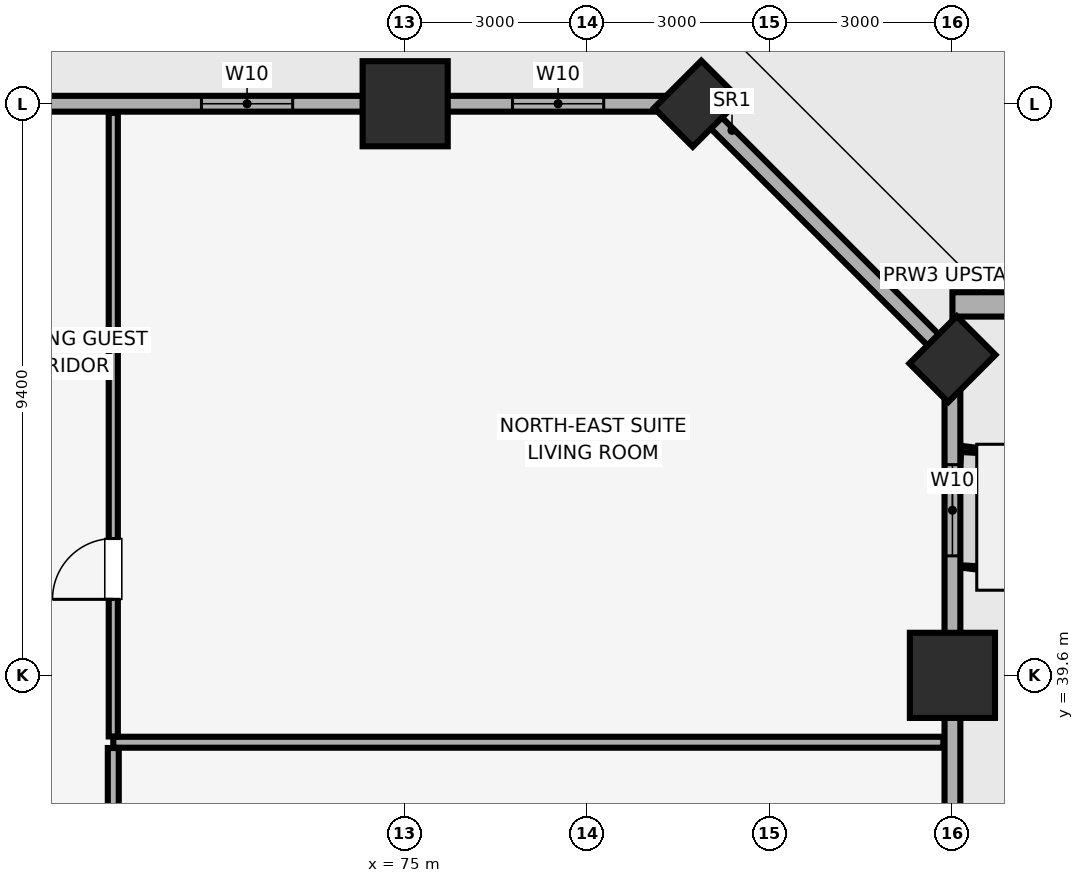
"""IFC4 building model, lengths in metres.
Left out: names, types, materials, properties, quantities, classifications, styles, units other than length and angle.
Written with IfcOpenShell. Run it as: python <this file> out.ifc"""

import sys

from ifc_helpers import new_model, si_unit, direction, frame, frame_2d, origin, origin_2d, place, context, subcontext, project, spatial, rectangle, extrude, element, fill, save


model = new_model("IFC4")
c1 = context("Model", 3, precision=1e-05, world=origin(), true_north=direction((0.0, 1.0)))
c2 = subcontext(c1, "Body", "Model", "MODEL_VIEW")
j1 = project(units=[si_unit("LENGTHUNIT", "METRE"), si_unit("PLANEANGLEUNIT", "RADIAN")], contexts=[c1])
p1 = place(None, origin())
s1 = spatial("IfcSite", under=j1, at=p1, CompositionType="ELEMENT")
p2 = place(p1, origin())
s2 = spatial("IfcBuilding", under=s1, at=p2, CompositionType="ELEMENT")
p3 = place(p2, frame((0.0, 0.0, 31.4)))
s3 = spatial("IfcBuildingStorey", under=s2, at=p3, CompositionType="ELEMENT", Elevation=31.4)
p4 = place(p3, frame((84.0, 39.6, 0.0), z_axis=(0.0, 0.0, 1.0), x_axis=(1.0, 0.0, 0.0)))
e1 = element("IfcColumn", 1, at=p4, inside=s3, PredefinedType="COLUMN", context=c2, shape_type="SweptSolid", body=[
    extrude(rectangle(XDim=1.4, YDim=1.4, at=origin_2d()), origin(), (0.0, 0.0, 1.0), 3.51),
])
for number, where, z_axis, x_axis in (
    (2, (84.0, 44.8, 0.0), (0.0, 0.0, 1.0), (0.707, 0.707, 0.0)),
    (3, (79.8, 49.0, 0.0), (0.0, 0.0, 1.0), (0.707, 0.707, 0.0)),
):
    element("IfcColumn", number, at=place(p3, frame(where, z_axis=z_axis, x_axis=x_axis)), inside=s3, PredefinedType="PILASTER", context=c2, shape_type="SweptSolid", body=[
        extrude(rectangle(XDim=1.1, YDim=0.9, at=origin_2d()), origin(), (0.0, 0.0, 1.0), 3.51),
    ])
p5 = place(p3, frame((75.0, 49.0, 0.0), z_axis=(0.0, 0.0, 1.0), x_axis=(1.0, 0.0, 0.0)))
e4 = element("IfcColumn", 4, at=p5, inside=s3, PredefinedType="COLUMN", context=c2, shape_type="SweptSolid", body=[
    extrude(rectangle(XDim=1.4, YDim=1.4, at=origin_2d()), origin(), (0.0, 0.0, 1.0), 3.51),
])
p6 = place(p3, frame((84.0, 4.2, 0.0), z_axis=(0.0, 0.0, 1.0), x_axis=(0.0, 1.0, 0.0)))
e5 = element("IfcWall", 5, at=p6, inside=s3, PredefinedType="SOLIDWALL", context=c2, shape_type="SweptSolid", body=[
    extrude(rectangle(XDim=40.6, YDim=0.26, at=frame_2d((20.3, 0.0))), origin(), (0.0, 0.0, 1.0), 2.56),
])
p7 = place(p6, frame((17.3, 0.0, 0.0)))
e6 = element("IfcOpeningElement", 6, at=p7, cuts=e5, PredefinedType="OPENING", context=c2, shape_type="SweptSolid", body=[
    extrude(rectangle(XDim=1.4, YDim=2.2, at=frame_2d((0.7, 1.1))), frame((0.0, 0.14, 0.0), z_axis=(0.0, -1.0, 0.0), x_axis=(1.0, 0.0, 0.0)), (0.0, 0.0, 1.0), 0.28),
])
p8 = place(p6, frame((7.675, 0.0, 0.85)))
e7 = element("IfcOpeningElement", 7, at=p8, cuts=e5, PredefinedType="OPENING", context=c2, shape_type="SweptSolid", body=[
    extrude(rectangle(XDim=1.5, YDim=1.4, at=frame_2d((0.75, 0.7))), frame((0.0, 0.14, 0.0), z_axis=(0.0, -1.0, 0.0), x_axis=(1.0, 0.0, 0.0)), (0.0, 0.0, 1.0), 0.28),
])
p9 = place(p6, frame((12.76, 0.0, 0.85)))
e8 = element("IfcOpeningElement", 8, at=p9, cuts=e5, PredefinedType="OPENING", context=c2, shape_type="SweptSolid", body=[
    extrude(rectangle(XDim=1.5, YDim=1.4, at=frame_2d((0.75, 0.7))), frame((0.0, 0.14, 0.0), z_axis=(0.0, -1.0, 0.0), x_axis=(1.0, 0.0, 0.0)), (0.0, 0.0, 1.0), 0.28),
])
p10 = place(p6, frame((21.11, 0.0, 0.85)))
e9 = element("IfcOpeningElement", 9, at=p10, cuts=e5, PredefinedType="OPENING", context=c2, shape_type="SweptSolid", body=[
    extrude(rectangle(XDim=1.5, YDim=1.4, at=frame_2d((0.75, 0.7))), frame((0.0, 0.14, 0.0), z_axis=(0.0, -1.0, 0.0), x_axis=(1.0, 0.0, 0.0)), (0.0, 0.0, 1.0), 0.28),
])
p11 = place(p6, frame((29.2, 0.0, 0.85)))
e10 = element("IfcOpeningElement", 10, at=p11, cuts=e5, PredefinedType="OPENING", context=c2, shape_type="SweptSolid", body=[
    extrude(rectangle(XDim=1.5, YDim=1.4, at=frame_2d((0.75, 0.7))), frame((0.0, 0.14, 0.0), z_axis=(0.0, -1.0, 0.0), x_axis=(1.0, 0.0, 0.0)), (0.0, 0.0, 1.0), 0.28),
])
p12 = place(p6, frame((37.365, 0.0, 0.85)))
e11 = element("IfcOpeningElement", 11, at=p12, cuts=e5, PredefinedType="OPENING", context=c2, shape_type="SweptSolid", body=[
    extrude(rectangle(XDim=1.5, YDim=1.4, at=frame_2d((0.75, 0.7))), frame((0.0, 0.14, 0.0), z_axis=(0.0, -1.0, 0.0), x_axis=(1.0, 0.0, 0.0)), (0.0, 0.0, 1.0), 0.28),
])
p13 = place(p3, frame((84.0, 44.8, 0.0), z_axis=(0.0, 0.0, 1.0), x_axis=(-0.707106781187, 0.707106781187, 0.0)))
e12 = element("IfcWall", 12, at=p13, inside=s3, PredefinedType="SOLIDWALL", context=c2, shape_type="SweptSolid", body=[
    extrude(rectangle(XDim=5.94, YDim=0.26, at=frame_2d((2.97, 0.0))), origin(), (0.0, 0.0, 1.0), 2.56),
])
p14 = place(p3, frame((79.8, 49.0, 0.0), z_axis=(0.0, 0.0, 1.0), x_axis=(-1.0, 0.0, 0.0)))
e13 = element("IfcWall", 13, at=p14, inside=s3, PredefinedType="SOLIDWALL", context=c2, shape_type="SweptSolid", body=[
    extrude(rectangle(XDim=75.6, YDim=0.26, at=frame_2d((37.8, 0.0))), origin(), (0.0, 0.0, 1.0), 2.56),
])
p15 = place(p14, frame((72.565, 0.0, 0.85)))
e14 = element("IfcOpeningElement", 14, at=p15, cuts=e13, PredefinedType="OPENING", context=c2, shape_type="SweptSolid", body=[
    extrude(rectangle(XDim=1.5, YDim=1.4, at=frame_2d((0.75, 0.7))), frame((0.0, 0.14, 0.0), z_axis=(0.0, -1.0, 0.0), x_axis=(1.0, 0.0, 0.0)), (0.0, 0.0, 1.0), 0.28),
])
p16 = place(p14, frame((67.45, 0.0, 0.85)))
e15 = element("IfcOpeningElement", 15, at=p16, cuts=e13, PredefinedType="OPENING", context=c2, shape_type="SweptSolid", body=[
    extrude(rectangle(XDim=1.5, YDim=1.4, at=frame_2d((0.75, 0.7))), frame((0.0, 0.14, 0.0), z_axis=(0.0, -1.0, 0.0), x_axis=(1.0, 0.0, 0.0)), (0.0, 0.0, 1.0), 0.28),
])
p17 = place(p14, frame((6.65, 0.0, 0.85)))
e16 = element("IfcOpeningElement", 16, at=p17, cuts=e13, PredefinedType="OPENING", context=c2, shape_type="SweptSolid", body=[
    extrude(rectangle(XDim=1.5, YDim=1.4, at=frame_2d((0.75, 0.7))), frame((0.0, 0.14, 0.0), z_axis=(0.0, -1.0, 0.0), x_axis=(1.0, 0.0, 0.0)), (0.0, 0.0, 1.0), 0.28),
])
p18 = place(p14, frame((1.535, 0.0, 0.85)))
e17 = element("IfcOpeningElement", 17, at=p18, cuts=e13, PredefinedType="OPENING", context=c2, shape_type="SweptSolid", body=[
    extrude(rectangle(XDim=1.5, YDim=1.4, at=frame_2d((0.75, 0.7))), frame((0.0, 0.14, 0.0), z_axis=(0.0, -1.0, 0.0), x_axis=(1.0, 0.0, 0.0)), (0.0, 0.0, 1.0), 0.28),
])
p19 = place(p14, frame((51.365, 0.0, 0.9)))
e18 = element("IfcOpeningElement", 18, at=p19, cuts=e13, PredefinedType="OPENING", context=c2, shape_type="SweptSolid", body=[
    extrude(rectangle(XDim=1.5, YDim=1.4, at=frame_2d((0.75, 0.7))), frame((0.0, 0.14, 0.0), z_axis=(0.0, -1.0, 0.0), x_axis=(1.0, 0.0, 0.0)), (0.0, 0.0, 1.0), 0.28),
])
p20 = place(p14, frame((46.0, 0.0, 0.9)))
e19 = element("IfcOpeningElement", 19, at=p20, cuts=e13, PredefinedType="OPENING", context=c2, shape_type="SweptSolid", body=[
    extrude(rectangle(XDim=1.5, YDim=1.4, at=frame_2d((0.75, 0.7))), frame((0.0, 0.14, 0.0), z_axis=(0.0, -1.0, 0.0), x_axis=(1.0, 0.0, 0.0)), (0.0, 0.0, 1.0), 0.28),
])
p21 = place(p14, frame((29.15, 0.0, 0.9)))
e20 = element("IfcOpeningElement", 20, at=p21, cuts=e13, PredefinedType="OPENING", context=c2, shape_type="SweptSolid", body=[
    extrude(rectangle(XDim=1.5, YDim=1.4, at=frame_2d((0.75, 0.7))), frame((0.0, 0.14, 0.0), z_axis=(0.0, -1.0, 0.0), x_axis=(1.0, 0.0, 0.0)), (0.0, 0.0, 1.0), 0.28),
])
p22 = place(p14, frame((23.485, 0.0, 0.9)))
e21 = element("IfcOpeningElement", 21, at=p22, cuts=e13, PredefinedType="OPENING", context=c2, shape_type="SweptSolid", body=[
    extrude(rectangle(XDim=1.5, YDim=1.4, at=frame_2d((0.75, 0.7))), frame((0.0, 0.14, 0.0), z_axis=(0.0, -1.0, 0.0), x_axis=(1.0, 0.0, 0.0)), (0.0, 0.0, 1.0), 0.28),
])
p23 = place(p3, frame((84.0, 45.7, -0.24), z_axis=(0.0, 0.0, 1.0), x_axis=(1.0, 0.0, 0.0)))
e22 = element("IfcWall", 22, at=p23, inside=s3, PredefinedType="PARAPET", context=c2, shape_type="SweptSolid", body=[
    extrude(rectangle(XDim=3.2, YDim=0.4, at=frame_2d((1.6, 0.0))), origin(), (0.0, 0.0, 1.0), 1.44),
])
p24 = place(p3, frame((70.2, 38.5, 0.0), z_axis=(0.0, 0.0, 1.0), x_axis=(1.0, 0.0, 0.0)))
e23 = element("IfcWall", 23, at=p24, inside=s3, PredefinedType="PARTITIONING", context=c2, shape_type="SweptSolid", body=[
    extrude(rectangle(XDim=13.65, YDim=0.18, at=frame_2d((6.825, 0.0))), origin(), (0.0, 0.0, 1.0), 3.51),
])
p25 = place(p3, frame((70.2, 29.495, 0.0), z_axis=(0.0, 0.0, 1.0), x_axis=(0.0, 1.0, 0.0)))
e24 = element("IfcWall", 24, at=p25, inside=s3, PredefinedType="PARTITIONING", context=c2, shape_type="SweptSolid", body=[
    extrude(rectangle(XDim=8.91, YDim=0.18, at=frame_2d((4.455, 0.0))), origin(), (0.0, 0.0, 1.0), 3.51),
])
p26 = place(p25, frame((5.59, 0.0, 0.0)))
e25 = element("IfcOpeningElement", 25, at=p26, cuts=e24, PredefinedType="OPENING", context=c2, shape_type="SweptSolid", body=[
    extrude(rectangle(XDim=1.0, YDim=2.15, at=frame_2d((0.5, 1.075))), frame((0.0, 0.1, 0.0), z_axis=(0.0, -1.0, 0.0), x_axis=(1.0, 0.0, 0.0)), (0.0, 0.0, 1.0), 0.2),
])
p27 = place(p3, frame((70.2, 38.595, 0.0), z_axis=(0.0, 0.0, 1.0), x_axis=(0.0, 1.0, 0.0)))
e26 = element("IfcWall", 26, at=p27, inside=s3, PredefinedType="PARTITIONING", context=c2, shape_type="SweptSolid", body=[
    extrude(rectangle(XDim=10.255, YDim=0.15, at=frame_2d((5.127, 0.0))), origin(), (0.0, 0.0, 1.0), 3.51),
])
p28 = place(p27, frame((2.255, 0.0, 0.0)))
e27 = element("IfcOpeningElement", 27, at=p28, cuts=e26, PredefinedType="OPENING", context=c2, shape_type="SweptSolid", body=[
    extrude(rectangle(XDim=1.0, YDim=2.15, at=frame_2d((0.5, 1.075))), frame((0.0, 0.085, 0.0), z_axis=(0.0, -1.0, 0.0), x_axis=(1.0, 0.0, 0.0)), (0.0, 0.0, 1.0), 0.17),
])
p29 = place(p3, frame((0.0, 0.0, -0.28)))
p30 = place(p29, frame((85.6, 42.2, 0.23)))
e28 = element("IfcWindow", 28, at=p30, inside=s3, PartitioningType="SINGLE_PANEL", PredefinedType="SKYLIGHT", context=c2, shape_type="SweptSolid", body=[
    extrude(rectangle(XDim=2.4, YDim=2.4, at=origin_2d()), origin(), (0.0, 0.0, 1.0), 0.05),
])
p31 = place(p12, origin())
e29 = element("IfcWindow", 29, at=p31, inside=s3, PartitioningType="SINGLE_PANEL", PredefinedType="WINDOW", context=c2, shape_type="SweptSolid", body=[
    extrude(rectangle(XDim=1.5, YDim=1.4, at=frame_2d((0.75, 0.7))), frame((0.0, 0.03, 0.0), z_axis=(0.0, -1.0, 0.0), x_axis=(1.0, 0.0, 0.0)), (0.0, 0.0, 1.0), 0.06),
])
fill(e11, e29)
p32 = place(p17, origin())
e30 = element("IfcWindow", 30, at=p32, inside=s3, PartitioningType="SINGLE_PANEL", PredefinedType="WINDOW", context=c2, shape_type="SweptSolid", body=[
    extrude(rectangle(XDim=1.5, YDim=1.4, at=frame_2d((0.75, 0.7))), frame((0.0, 0.03, 0.0), z_axis=(0.0, -1.0, 0.0), x_axis=(1.0, 0.0, 0.0)), (0.0, 0.0, 1.0), 0.06),
])
fill(e16, e30)
p33 = place(p18, origin())
e31 = element("IfcWindow", 31, at=p33, inside=s3, PartitioningType="SINGLE_PANEL", PredefinedType="WINDOW", context=c2, shape_type="SweptSolid", body=[
    extrude(rectangle(XDim=1.5, YDim=1.4, at=frame_2d((0.75, 0.7))), frame((0.0, 0.03, 0.0), z_axis=(0.0, -1.0, 0.0), x_axis=(1.0, 0.0, 0.0)), (0.0, 0.0, 1.0), 0.06),
])
fill(e17, e31)
p34 = place(p28, origin())
e32 = element("IfcDoor", 32, at=p34, inside=s3, OperationType="SINGLE_SWING_LEFT", PredefinedType="DOOR", context=c2, shape_type="SweptSolid", body=[
    extrude(rectangle(XDim=1.0, YDim=2.15, at=frame_2d((0.5, 1.075))), frame((0.0, 0.025, 0.0), z_axis=(0.0, -1.0, 0.0), x_axis=(1.0, 0.0, 0.0)), (0.0, 0.0, 1.0), 0.05),
])
fill(e27, e32)
save(model, sys.argv[1])
